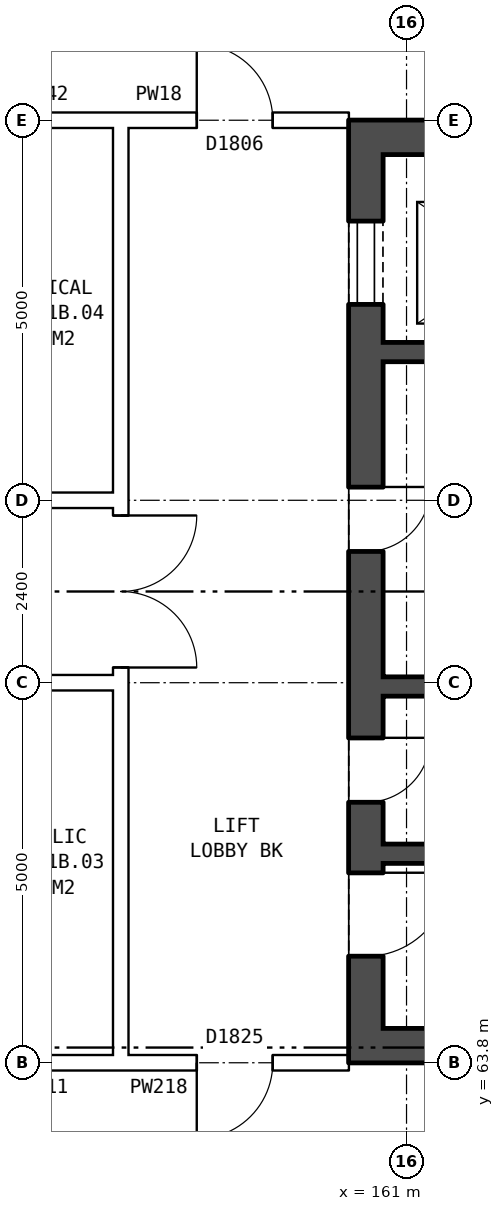
"""IFC4 building model, lengths in metres.
Left out: names, types, materials, properties, quantities, classifications, styles, units other than length and angle.
Written with IfcOpenShell. Run it as: python <this file> out.ifc"""

import sys

from ifc_helpers import new_model, si_unit, direction, frame, frame_2d, origin, place, context, subcontext, project, spatial, rectangle, extrude, element, fill, save


model = new_model("IFC4")
c1 = context("Model", 3, precision=1e-05, world=origin(), true_north=direction((0.0, 1.0)))
c2 = subcontext(c1, "Body", "Model", "MODEL_VIEW")
j1 = project(units=[si_unit("LENGTHUNIT", "METRE"), si_unit("PLANEANGLEUNIT", "RADIAN")], contexts=[c1])
p1 = place(None, origin())
s1 = spatial("IfcSite", under=j1, at=p1, CompositionType="ELEMENT")
p2 = place(p1, origin())
s2 = spatial("IfcBuilding", under=s1, at=p2, CompositionType="ELEMENT")
p3 = place(p2, frame((0.0, 0.0, 182.0)))
s3 = spatial("IfcBuildingStorey", under=s2, at=p3, CompositionType="ELEMENT", Elevation=182.0)
p4 = place(p3, frame((160.465, 76.2, 0.0), z_axis=(0.0, 0.0, 1.0), x_axis=(0.0, -1.0, 0.0)))
e1 = element("IfcWall", 1, at=p4, inside=s3, PredefinedType="SHEAR", context=c2, shape_type="SweptSolid", body=[
    extrude(rectangle(XDim=12.4, YDim=0.45, at=frame_2d((6.2, 0.0))), origin(), (0.0, 0.0, 1.0), 2.85),
])
p5 = place(p4, frame((1.325, 0.0, 0.0)))
e2 = element("IfcOpeningElement", 2, at=p5, cuts=e1, PredefinedType="OPENING", context=c2, shape_type="SweptSolid", body=[
    extrude(rectangle(XDim=1.1, YDim=2.1, at=frame_2d((0.55, 1.05))), frame((0.0, 0.235, 0.0), z_axis=(0.0, -1.0, 0.0), x_axis=(1.0, 0.0, 0.0)), (0.0, 0.0, 1.0), 0.47),
])
p6 = place(p4, frame((4.825, 0.0, 0.0)))
e3 = element("IfcOpeningElement", 3, at=p6, cuts=e1, PredefinedType="OPENING", context=c2, shape_type="SweptSolid", body=[
    extrude(rectangle(XDim=0.85, YDim=2.1, at=frame_2d((0.425, 1.05))), frame((0.0, 0.235, 0.0), z_axis=(0.0, -1.0, 0.0), x_axis=(1.0, 0.0, 0.0)), (0.0, 0.0, 1.0), 0.47),
])
p7 = place(p4, frame((9.9, 0.0, 0.0)))
e4 = element("IfcOpeningElement", 4, at=p7, cuts=e1, PredefinedType="OPENING", context=c2, shape_type="SweptSolid", body=[
    extrude(rectangle(XDim=1.1, YDim=2.1, at=frame_2d((0.55, 1.05))), frame((0.0, 0.235, 0.0), z_axis=(0.0, -1.0, 0.0), x_axis=(1.0, 0.0, 0.0)), (0.0, 0.0, 1.0), 0.47),
])
p8 = place(p4, frame((8.125, 0.0, 0.0)))
e5 = element("IfcOpeningElement", 5, at=p8, cuts=e1, PredefinedType="OPENING", context=c2, shape_type="SweptSolid", body=[
    extrude(rectangle(XDim=0.85, YDim=2.1, at=frame_2d((0.425, 1.05))), frame((0.0, 0.235, 0.0), z_axis=(0.0, -1.0, 0.0), x_axis=(1.0, 0.0, 0.0)), (0.0, 0.0, 1.0), 0.47),
])
for number, where, z_axis, x_axis in (
    (6, (160.69, 75.975, 0.0), (0.0, 0.0, 1.0), (1.0, 0.0, 0.0)),
    (7, (160.69, 64.025, 0.0), (0.0, 0.0, 1.0), (1.0, 0.0, 0.0)),
):
    element("IfcWall", number, at=place(p3, frame(where, z_axis=z_axis, x_axis=x_axis)), inside=s3, PredefinedType="SHEAR", context=c2, shape_type="SweptSolid", body=[
        extrude(rectangle(XDim=7.5, YDim=0.45, at=frame_2d((3.75, 0.0))), origin(), (0.0, 0.0, 1.0), 2.85),
    ])
p9 = place(p3, frame((160.69, 73.15, 0.0), z_axis=(0.0, 0.0, 1.0), x_axis=(1.0, 0.0, 0.0)))
e8 = element("IfcWall", 8, at=p9, inside=s3, PredefinedType="SHEAR", context=c2, shape_type="SweptSolid", body=[
    extrude(rectangle(XDim=4.675, YDim=0.25, at=frame_2d((2.337, 0.0))), origin(), (0.0, 0.0, 1.0), 2.85),
])
p10 = place(p3, frame((160.69, 68.75, 0.0), z_axis=(0.0, 0.0, 1.0), x_axis=(1.0, 0.0, 0.0)))
e9 = element("IfcWall", 9, at=p10, inside=s3, PredefinedType="SHEAR", context=c2, shape_type="SweptSolid", body=[
    extrude(rectangle(XDim=7.5, YDim=0.25, at=frame_2d((3.75, 0.0))), origin(), (0.0, 0.0, 1.0), 2.85),
])
p11 = place(p10, frame((5.075, 0.0, 0.0)))
e10 = element("IfcOpeningElement", 10, at=p11, cuts=e9, PredefinedType="OPENING", context=c2, shape_type="SweptSolid", body=[
    extrude(rectangle(XDim=1.1, YDim=2.1, at=frame_2d((0.55, 1.05))), frame((0.0, 0.135, 0.0), z_axis=(0.0, -1.0, 0.0), x_axis=(1.0, 0.0, 0.0)), (0.0, 0.0, 1.0), 0.27),
])
p12 = place(p10, frame((3.275, 0.0, 0.0)))
e11 = element("IfcOpeningElement", 11, at=p12, cuts=e9, PredefinedType="OPENING", context=c2, shape_type="SweptSolid", body=[
    extrude(rectangle(XDim=0.85, YDim=2.1, at=frame_2d((0.425, 1.05))), frame((0.0, 0.135, 0.0), z_axis=(0.0, -1.0, 0.0), x_axis=(1.0, 0.0, 0.0)), (0.0, 0.0, 1.0), 0.27),
])
p13 = place(p3, frame((160.69, 66.55, 0.0), z_axis=(0.0, 0.0, 1.0), x_axis=(1.0, 0.0, 0.0)))
e12 = element("IfcWall", 12, at=p13, inside=s3, PredefinedType="SHEAR", context=c2, shape_type="SweptSolid", body=[
    extrude(rectangle(XDim=2.475, YDim=0.25, at=frame_2d((1.238, 0.0))), origin(), (0.0, 0.0, 1.0), 2.85),
])
p14 = place(p3, frame((157.24, 63.9, 0.0), z_axis=(0.0, 0.0, 1.0), x_axis=(0.0, 1.0, 0.0)))
e13 = element("IfcWall", 13, at=p14, inside=s3, PredefinedType="PARTITIONING", context=c2, shape_type="SweptSolid", body=[
    extrude(rectangle(XDim=12.2, YDim=0.2, at=frame_2d((6.1, 0.0))), origin(), (0.0, 0.0, 1.0), 2.85),
])
p15 = place(p14, frame((5.1, 0.0, 0.0)))
e14 = element("IfcOpeningElement", 14, at=p15, cuts=e13, PredefinedType="OPENING", context=c2, shape_type="SweptSolid", body=[
    extrude(rectangle(XDim=2.0, YDim=2.1, at=frame_2d((1.0, 1.05))), frame((0.0, 0.11, 0.0), z_axis=(0.0, -1.0, 0.0), x_axis=(1.0, 0.0, 0.0)), (0.0, 0.0, 1.0), 0.22),
])
p16 = place(p3, frame((155.1, 63.8, 0.0), z_axis=(0.0, 0.0, 1.0), x_axis=(1.0, 0.0, 0.0)))
e15 = element("IfcWall", 15, at=p16, inside=s3, PredefinedType="PARTITIONING", context=c2, shape_type="SweptSolid", body=[
    extrude(rectangle(XDim=2.14, YDim=0.2, at=frame_2d((1.07, 0.0))), origin(), (0.0, 0.0, 1.0), 2.85),
])
p17 = place(p3, frame((157.24, 63.8, 0.0), z_axis=(0.0, 0.0, 1.0), x_axis=(1.0, 0.0, 0.0)))
e16 = element("IfcWall", 16, at=p17, inside=s3, PredefinedType="PARTITIONING", context=c2, shape_type="SweptSolid", body=[
    extrude(rectangle(XDim=3.0, YDim=0.2, at=frame_2d((1.5, 0.0))), origin(), (0.0, 0.0, 1.0), 2.85),
])
p18 = place(p17, frame((1.0, 0.0, 0.0)))
e17 = element("IfcOpeningElement", 17, at=p18, cuts=e16, PredefinedType="OPENING", context=c2, shape_type="SweptSolid", body=[
    extrude(rectangle(XDim=1.0, YDim=2.1, at=frame_2d((0.5, 1.05))), frame((0.0, 0.11, 0.0), z_axis=(0.0, -1.0, 0.0), x_axis=(1.0, 0.0, 0.0)), (0.0, 0.0, 1.0), 0.22),
])
p19 = place(p3, frame((142.76, 68.8, 0.0), z_axis=(0.0, 0.0, 1.0), x_axis=(1.0, 0.0, 0.0)))
e18 = element("IfcWall", 18, at=p19, inside=s3, PredefinedType="PARTITIONING", context=c2, shape_type="SweptSolid", body=[
    extrude(rectangle(XDim=14.48, YDim=0.2, at=frame_2d((7.24, 0.0))), origin(), (0.0, 0.0, 1.0), 2.85),
])
p20 = place(p19, frame((1.12, 0.0, 0.0)))
e19 = element("IfcOpeningElement", 19, at=p20, cuts=e18, PredefinedType="OPENING", context=c2, shape_type="SweptSolid", body=[
    extrude(rectangle(XDim=1.0, YDim=2.1, at=frame_2d((0.5, 1.05))), frame((0.0, 0.11, 0.0), z_axis=(0.0, -1.0, 0.0), x_axis=(1.0, 0.0, 0.0)), (0.0, 0.0, 1.0), 0.22),
])
p21 = place(p19, frame((10.24, 0.0, 0.0)))
e20 = element("IfcOpeningElement", 20, at=p21, cuts=e18, PredefinedType="OPENING", context=c2, shape_type="SweptSolid", body=[
    extrude(rectangle(XDim=1.0, YDim=2.1, at=frame_2d((0.5, 1.05))), frame((0.0, 0.11, 0.0), z_axis=(0.0, -1.0, 0.0), x_axis=(1.0, 0.0, 0.0)), (0.0, 0.0, 1.0), 0.22),
])
p22 = place(p3, frame((142.76, 71.2, 0.0), z_axis=(0.0, 0.0, 1.0), x_axis=(1.0, 0.0, 0.0)))
e21 = element("IfcWall", 21, at=p22, inside=s3, PredefinedType="PARTITIONING", context=c2, shape_type="SweptSolid", body=[
    extrude(rectangle(XDim=14.48, YDim=0.2, at=frame_2d((7.24, 0.0))), origin(), (0.0, 0.0, 1.0), 2.85),
])
p23 = place(p22, frame((1.12, 0.0, 0.0)))
e22 = element("IfcOpeningElement", 22, at=p23, cuts=e21, PredefinedType="OPENING", context=c2, shape_type="SweptSolid", body=[
    extrude(rectangle(XDim=1.0, YDim=2.1, at=frame_2d((0.5, 1.05))), frame((0.0, 0.11, 0.0), z_axis=(0.0, -1.0, 0.0), x_axis=(1.0, 0.0, 0.0)), (0.0, 0.0, 1.0), 0.22),
])
p24 = place(p22, frame((7.24, 0.0, 0.0)))
e23 = element("IfcOpeningElement", 23, at=p24, cuts=e21, PredefinedType="OPENING", context=c2, shape_type="SweptSolid", body=[
    extrude(rectangle(XDim=1.0, YDim=2.1, at=frame_2d((0.5, 1.05))), frame((0.0, 0.11, 0.0), z_axis=(0.0, -1.0, 0.0), x_axis=(1.0, 0.0, 0.0)), (0.0, 0.0, 1.0), 0.22),
])
p25 = place(p3, frame((155.1, 76.2, 0.0), z_axis=(0.0, 0.0, 1.0), x_axis=(1.0, 0.0, 0.0)))
e24 = element("IfcWall", 24, at=p25, inside=s3, PredefinedType="PARTITIONING", context=c2, shape_type="SweptSolid", body=[
    extrude(rectangle(XDim=2.14, YDim=0.2, at=frame_2d((1.07, 0.0))), origin(), (0.0, 0.0, 1.0), 2.85),
])
p26 = place(p3, frame((157.24, 76.2, 0.0), z_axis=(0.0, 0.0, 1.0), x_axis=(1.0, 0.0, 0.0)))
e25 = element("IfcWall", 25, at=p26, inside=s3, PredefinedType="PARTITIONING", context=c2, shape_type="SweptSolid", body=[
    extrude(rectangle(XDim=3.0, YDim=0.2, at=frame_2d((1.5, 0.0))), origin(), (0.0, 0.0, 1.0), 2.85),
])
p27 = place(p26, frame((1.0, 0.0, 0.0)))
e26 = element("IfcOpeningElement", 26, at=p27, cuts=e25, PredefinedType="OPENING", context=c2, shape_type="SweptSolid", body=[
    extrude(rectangle(XDim=1.0, YDim=2.1, at=frame_2d((0.5, 1.05))), frame((0.0, 0.11, 0.0), z_axis=(0.0, -1.0, 0.0), x_axis=(1.0, 0.0, 0.0)), (0.0, 0.0, 1.0), 0.22),
])
p28 = place(p5, origin())
e27 = element("IfcDoor", 27, at=p28, inside=s3, OperationType="DOUBLE_DOOR_SLIDING", PredefinedType="DOOR", context=c2, shape_type="SweptSolid", body=[
    extrude(rectangle(XDim=1.1, YDim=2.1, at=frame_2d((0.55, 1.05))), frame((0.0, 0.21, 0.0), z_axis=(0.0, -1.0, 0.0), x_axis=(1.0, 0.0, 0.0)), (0.0, 0.0, 1.0), 0.05),
])
fill(e2, e27)
p29 = place(p6, origin())
e28 = element("IfcDoor", 28, at=p29, inside=s3, OperationType="SINGLE_SWING_LEFT", PredefinedType="DOOR", context=c2, shape_type="SweptSolid", body=[
    extrude(rectangle(XDim=0.85, YDim=2.1, at=frame_2d((0.425, 1.05))), frame((0.0, 0.21, 0.0), z_axis=(0.0, -1.0, 0.0), x_axis=(1.0, 0.0, 0.0)), (0.0, 0.0, 1.0), 0.05),
])
fill(e3, e28)
p30 = place(p7, origin())
e29 = element("IfcDoor", 29, at=p30, inside=s3, OperationType="SINGLE_SWING_LEFT", PredefinedType="DOOR", context=c2, shape_type="SweptSolid", body=[
    extrude(rectangle(XDim=1.1, YDim=2.1, at=frame_2d((0.55, 1.05))), frame((0.0, 0.21, 0.0), z_axis=(0.0, -1.0, 0.0), x_axis=(1.0, 0.0, 0.0)), (0.0, 0.0, 1.0), 0.05),
])
fill(e4, e29)
p31 = place(p8, origin())
e30 = element("IfcDoor", 30, at=p31, inside=s3, OperationType="SINGLE_SWING_LEFT", PredefinedType="DOOR", context=c2, shape_type="SweptSolid", body=[
    extrude(rectangle(XDim=0.85, YDim=2.1, at=frame_2d((0.425, 1.05))), frame((0.0, 0.21, 0.0), z_axis=(0.0, -1.0, 0.0), x_axis=(1.0, 0.0, 0.0)), (0.0, 0.0, 1.0), 0.05),
])
fill(e5, e30)
p32 = place(p15, frame((2.0, 0.0, 0.0), z_axis=(0.0, 0.0, 1.0), x_axis=(-1.0, 0.0, 0.0)))
e31 = element("IfcDoor", 31, at=p32, inside=s3, OperationType="DOUBLE_DOOR_SINGLE_SWING", PredefinedType="DOOR", context=c2, shape_type="SweptSolid", body=[
    extrude(rectangle(XDim=2.0, YDim=2.1, at=frame_2d((1.0, 1.05))), frame((0.0, 0.025, 0.0), z_axis=(0.0, -1.0, 0.0), x_axis=(1.0, 0.0, 0.0)), (0.0, 0.0, 1.0), 0.05),
])
fill(e14, e31)
p33 = place(p18, frame((1.0, 0.0, 0.0), z_axis=(0.0, 0.0, 1.0), x_axis=(-1.0, 0.0, 0.0)))
e32 = element("IfcDoor", 32, at=p33, inside=s3, OperationType="SINGLE_SWING_RIGHT", PredefinedType="DOOR", context=c2, shape_type="SweptSolid", body=[
    extrude(rectangle(XDim=1.0, YDim=2.1, at=frame_2d((0.5, 1.05))), frame((0.0, 0.025, 0.0), z_axis=(0.0, -1.0, 0.0), x_axis=(1.0, 0.0, 0.0)), (0.0, 0.0, 1.0), 0.05),
])
fill(e17, e32)
p34 = place(p27, origin())
e33 = element("IfcDoor", 33, at=p34, inside=s3, OperationType="SINGLE_SWING_LEFT", PredefinedType="DOOR", context=c2, shape_type="SweptSolid", body=[
    extrude(rectangle(XDim=1.0, YDim=2.1, at=frame_2d((0.5, 1.05))), frame((0.0, 0.025, 0.0), z_axis=(0.0, -1.0, 0.0), x_axis=(1.0, 0.0, 0.0)), (0.0, 0.0, 1.0), 0.05),
])
fill(e26, e33)
save(model, sys.argv[1])
